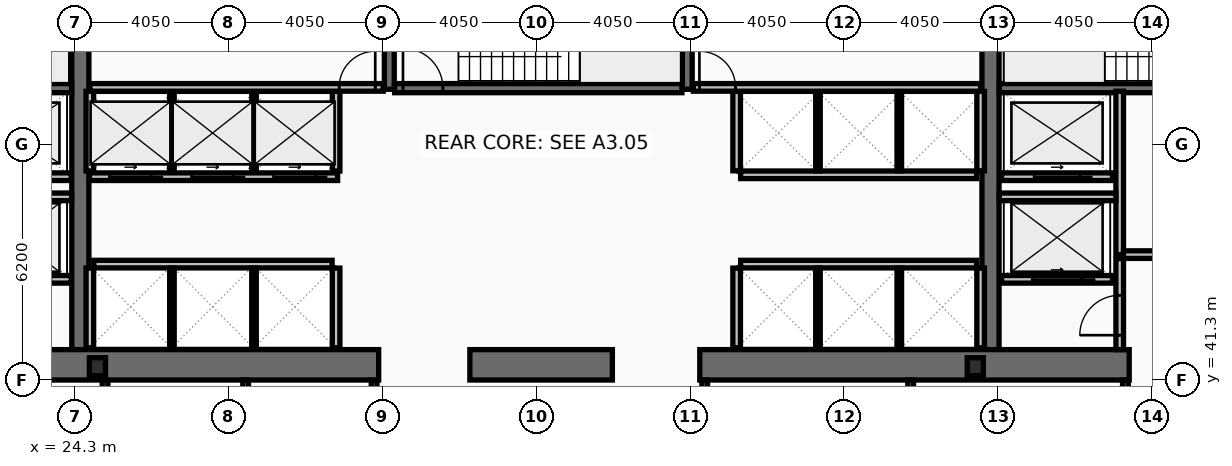
"""IFC4 building model, lengths in metres.
Left out: names, types, materials, properties, quantities, classifications, styles, units other than length and angle.
Written with IfcOpenShell. Run it as: python <this file> out.ifc"""

import sys

from ifc_helpers import new_model, si_unit, direction, frame, frame_2d, origin, origin_2d, place, context, subcontext, project, spatial, rectangle, i_section, extrude, element, fill, save


model = new_model("IFC4")
c1 = context("Model", 3, precision=1e-05, world=origin(), true_north=direction((0.0, 1.0)))
c2 = subcontext(c1, "Body", "Model", "MODEL_VIEW")
j1 = project(units=[si_unit("LENGTHUNIT", "METRE"), si_unit("PLANEANGLEUNIT", "RADIAN")], contexts=[c1])
p1 = place(None, origin())
s1 = spatial("IfcSite", under=j1, at=p1, CompositionType="ELEMENT")
p2 = place(p1, origin())
s2 = spatial("IfcBuilding", under=s1, at=p2, CompositionType="ELEMENT")
p3 = place(p2, frame((0.0, 0.0, 45.8)))
s3 = spatial("IfcBuildingStorey", under=s2, at=p3, CompositionType="ELEMENT", Elevation=45.8)
for number, where, z_axis, x_axis in (
    (1, (24.45, 42.1, 0.0), (0.0, 0.0, 1.0), (0.0, 1.0, 0.0)),
    (2, (48.4, 42.1, 0.0), (0.0, 0.0, 1.0), (0.0, 1.0, 0.0)),
):
    element("IfcWall", number, at=place(p3, frame(where, z_axis=z_axis, x_axis=x_axis)), inside=s3, PredefinedType="SHEAR", context=c2, shape_type="SweptSolid", body=[
        extrude(rectangle(XDim=10.8, YDim=0.45, at=frame_2d((5.4, 0.0))), origin(), (0.0, 0.0, 1.0), 3.82),
    ])
p4 = place(p3, frame((32.3, 41.7, 0.0), z_axis=(0.0, 0.0, 1.0), x_axis=(-1.0, 0.0, 0.0)))
e3 = element("IfcWall", 3, at=p4, inside=s3, PredefinedType="SHEAR", context=c2, shape_type="SweptSolid", body=[
    extrude(rectangle(XDim=11.45, YDim=0.8, at=frame_2d((5.725, 0.0))), origin(), (0.0, 0.0, 1.0), 3.82),
])
p5 = place(p3, frame((38.45, 41.7, 0.0), z_axis=(0.0, 0.0, 1.0), x_axis=(-1.0, 0.0, 0.0)))
e4 = element("IfcWall", 4, at=p5, inside=s3, PredefinedType="SHEAR", context=c2, shape_type="SweptSolid", body=[
    extrude(rectangle(XDim=3.75, YDim=0.8, at=frame_2d((1.875, 0.0))), origin(), (0.0, 0.0, 1.0), 3.82),
])
p6 = place(p3, frame((52.05, 41.7, 0.0), z_axis=(0.0, 0.0, 1.0), x_axis=(-1.0, 0.0, 0.0)))
e5 = element("IfcWall", 5, at=p6, inside=s3, PredefinedType="SHEAR", context=c2, shape_type="SweptSolid", body=[
    extrude(rectangle(XDim=11.3, YDim=0.8, at=frame_2d((5.65, 0.0))), origin(), (0.0, 0.0, 1.0), 3.82),
])
for number, where, z_axis, x_axis in (
    (6, (32.58, 48.95, 0.0), (0.0, 0.0, 1.0), (0.0, 1.0, 0.0)),
    (7, (40.42, 48.95, 0.0), (0.0, 0.0, 1.0), (0.0, 1.0, 0.0)),
):
    element("IfcWall", number, at=place(p3, frame(where, z_axis=z_axis, x_axis=x_axis)), inside=s3, PredefinedType="SHEAR", context=c2, shape_type="SweptSolid", body=[
        extrude(rectangle(XDim=3.95, YDim=0.26, at=frame_2d((1.975, 0.0))), origin(), (0.0, 0.0, 1.0), 3.82),
    ])
p7 = place(p3, frame((17.0, 48.98, 0.0), z_axis=(0.0, 0.0, 1.0), x_axis=(1.0, 0.0, 0.0)))
e8 = element("IfcWall", 8, at=p7, inside=s3, PredefinedType="SHEAR", context=c2, shape_type="SweptSolid", body=[
    extrude(rectangle(XDim=7.22, YDim=0.24, at=frame_2d((3.61, 0.0))), origin(), (0.0, 0.0, 1.0), 3.82),
])
p8 = place(p7, frame((0.22, 0.0, 0.0)))
e9 = element("IfcOpeningElement", 9, at=p8, cuts=e8, PredefinedType="OPENING", context=c2, shape_type="SweptSolid", body=[
    extrude(rectangle(XDim=1.05, YDim=2.15, at=frame_2d((0.525, 1.075))), frame((0.0, 0.13, 0.0), z_axis=(0.0, -1.0, 0.0), x_axis=(1.0, 0.0, 0.0)), (0.0, 0.0, 1.0), 0.26),
])
p9 = place(p3, frame((48.63, 48.98, 0.0), z_axis=(0.0, 0.0, 1.0), x_axis=(1.0, 0.0, 0.0)))
e10 = element("IfcWall", 10, at=p9, inside=s3, PredefinedType="SHEAR", context=c2, shape_type="SweptSolid", body=[
    extrude(rectangle(XDim=7.27, YDim=0.24, at=frame_2d((3.635, 0.0))), origin(), (0.0, 0.0, 1.0), 3.82),
])
p10 = place(p9, frame((6.0, 0.0, 0.0)))
e11 = element("IfcOpeningElement", 11, at=p10, cuts=e10, PredefinedType="OPENING", context=c2, shape_type="SweptSolid", body=[
    extrude(rectangle(XDim=1.05, YDim=2.15, at=frame_2d((0.525, 1.075))), frame((0.0, 0.13, 0.0), z_axis=(0.0, -1.0, 0.0), x_axis=(1.0, 0.0, 0.0)), (0.0, 0.0, 1.0), 0.26),
])
p11 = place(p3, frame((32.72, 48.98, 0.0), z_axis=(0.0, 0.0, 1.0), x_axis=(1.0, 0.0, 0.0)))
e12 = element("IfcWall", 12, at=p11, inside=s3, PredefinedType="SHEAR", context=c2, shape_type="SweptSolid", body=[
    extrude(rectangle(XDim=7.56, YDim=0.24, at=frame_2d((3.78, 0.0))), origin(), (0.0, 0.0, 1.0), 3.82),
])
p12 = place(p11, frame((0.22, 0.0, 0.0)))
e13 = element("IfcOpeningElement", 13, at=p12, cuts=e12, PredefinedType="OPENING", context=c2, shape_type="SweptSolid", body=[
    extrude(rectangle(XDim=1.05, YDim=2.15, at=frame_2d((0.525, 1.075))), frame((0.0, 0.13, 0.0), z_axis=(0.0, -1.0, 0.0), x_axis=(1.0, 0.0, 0.0)), (0.0, 0.0, 1.0), 0.26),
])
for number, where, z_axis, x_axis in (
    (14, (24.9, 41.65, 0.0), (0.0, 0.0, 1.0), (1.0, 0.0, 0.0)),
    (15, (48.0, 41.65, 0.0), (0.0, 0.0, 1.0), (1.0, 0.0, 0.0)),
):
    element("IfcColumn", number, at=place(p3, frame(where, z_axis=z_axis, x_axis=x_axis)), inside=s3, PredefinedType="COLUMN", context=c2, shape_type="SweptSolid", body=[
        extrude(i_section(OverallWidth=0.424, OverallDepth=0.474, WebThickness=0.048, FlangeThickness=0.077, at=origin_2d()), origin(), (0.0, 0.0, 1.0), 4.0),
    ])
p13 = place(p3, frame((51.61, 43.95, 0.0), z_axis=(0.0, 0.0, 1.0), x_axis=(-1.0, 0.0, 0.0)))
e16 = element("IfcWall", 16, at=p13, inside=s3, PredefinedType="PARTITIONING", context=c2, shape_type="SweptSolid", body=[
    extrude(rectangle(XDim=2.92, YDim=0.2, at=frame_2d((1.46, 0.0))), origin(), (0.0, 0.0, 1.0), 3.82),
])
p14 = place(p13, frame((0.81, 0.0, 0.0)))
e17 = element("IfcOpeningElement", 17, at=p14, cuts=e16, PredefinedType="OPENING", context=c2, shape_type="SweptSolid", body=[
    extrude(rectangle(XDim=1.3, YDim=2.18, at=frame_2d((0.65, 1.09))), frame((0.0, 0.11, 0.0), z_axis=(0.0, -1.0, 0.0), x_axis=(1.0, 0.0, 0.0)), (0.0, 0.0, 1.0), 0.22),
])
p15 = place(p3, frame((24.21, 43.95, 0.0), z_axis=(0.0, 0.0, 1.0), x_axis=(-1.0, 0.0, 0.0)))
e18 = element("IfcWall", 18, at=p15, inside=s3, PredefinedType="PARTITIONING", context=c2, shape_type="SweptSolid", body=[
    extrude(rectangle(XDim=2.97, YDim=0.2, at=frame_2d((1.485, 0.0))), origin(), (0.0, 0.0, 1.0), 3.82),
])
p16 = place(p15, frame((0.86, 0.0, 0.0)))
e19 = element("IfcOpeningElement", 19, at=p16, cuts=e18, PredefinedType="OPENING", context=c2, shape_type="SweptSolid", body=[
    extrude(rectangle(XDim=1.3, YDim=2.18, at=frame_2d((0.65, 1.09))), frame((0.0, 0.11, 0.0), z_axis=(0.0, -1.0, 0.0), x_axis=(1.0, 0.0, 0.0)), (0.0, 0.0, 1.0), 0.22),
])
p17 = place(p3, frame((51.61, 46.65, 0.0), z_axis=(0.0, 0.0, 1.0), x_axis=(-1.0, 0.0, 0.0)))
e20 = element("IfcWall", 20, at=p17, inside=s3, PredefinedType="PARTITIONING", context=c2, shape_type="SweptSolid", body=[
    extrude(rectangle(XDim=2.92, YDim=0.2, at=frame_2d((1.46, 0.0))), origin(), (0.0, 0.0, 1.0), 3.82),
])
p18 = place(p17, frame((0.86, 0.0, 0.0)))
e21 = element("IfcOpeningElement", 21, at=p18, cuts=e20, PredefinedType="OPENING", context=c2, shape_type="SweptSolid", body=[
    extrude(rectangle(XDim=1.2, YDim=2.18, at=frame_2d((0.6, 1.09))), frame((0.0, 0.11, 0.0), z_axis=(0.0, -1.0, 0.0), x_axis=(1.0, 0.0, 0.0)), (0.0, 0.0, 1.0), 0.22),
])
p19 = place(p3, frame((24.21, 46.65, 0.0), z_axis=(0.0, 0.0, 1.0), x_axis=(-1.0, 0.0, 0.0)))
e22 = element("IfcWall", 22, at=p19, inside=s3, PredefinedType="PARTITIONING", context=c2, shape_type="SweptSolid", body=[
    extrude(rectangle(XDim=2.97, YDim=0.2, at=frame_2d((1.485, 0.0))), origin(), (0.0, 0.0, 1.0), 3.82),
])
p20 = place(p19, frame((0.91, 0.0, 0.0)))
e23 = element("IfcOpeningElement", 23, at=p20, cuts=e22, PredefinedType="OPENING", context=c2, shape_type="SweptSolid", body=[
    extrude(rectangle(XDim=1.2, YDim=2.18, at=frame_2d((0.6, 1.09))), frame((0.0, 0.11, 0.0), z_axis=(0.0, -1.0, 0.0), x_axis=(1.0, 0.0, 0.0)), (0.0, 0.0, 1.0), 0.22),
])
p21 = place(p3, frame((31.22, 46.65, 0.0), z_axis=(0.0, 0.0, 1.0), x_axis=(-1.0, 0.0, 0.0)))
e24 = element("IfcWall", 24, at=p21, inside=s3, PredefinedType="PARTITIONING", context=c2, shape_type="SweptSolid", body=[
    extrude(rectangle(XDim=6.53, YDim=0.2, at=frame_2d((3.265, 0.0))), origin(), (0.0, 0.0, 1.0), 3.82),
])
p22 = place(p21, frame((4.9, 0.0, 0.0)))
e25 = element("IfcOpeningElement", 25, at=p22, cuts=e24, PredefinedType="OPENING", context=c2, shape_type="SweptSolid", body=[
    extrude(rectangle(XDim=1.1, YDim=2.18, at=frame_2d((0.55, 1.09))), frame((0.0, 0.11, 0.0), z_axis=(0.0, -1.0, 0.0), x_axis=(1.0, 0.0, 0.0)), (0.0, 0.0, 1.0), 0.22),
])
p23 = place(p21, frame((2.74, 0.0, 0.0)))
e26 = element("IfcOpeningElement", 26, at=p23, cuts=e24, PredefinedType="OPENING", context=c2, shape_type="SweptSolid", body=[
    extrude(rectangle(XDim=1.1, YDim=2.18, at=frame_2d((0.55, 1.09))), frame((0.0, 0.11, 0.0), z_axis=(0.0, -1.0, 0.0), x_axis=(1.0, 0.0, 0.0)), (0.0, 0.0, 1.0), 0.22),
])
p24 = place(p21, frame((0.58, 0.0, 0.0)))
e27 = element("IfcOpeningElement", 27, at=p24, cuts=e24, PredefinedType="OPENING", context=c2, shape_type="SweptSolid", body=[
    extrude(rectangle(XDim=1.1, YDim=2.18, at=frame_2d((0.55, 1.09))), frame((0.0, 0.11, 0.0), z_axis=(0.0, -1.0, 0.0), x_axis=(1.0, 0.0, 0.0)), (0.0, 0.0, 1.0), 0.22),
])
p25 = place(p3, frame((21.2, 46.12, 0.0), z_axis=(0.0, 0.0, 1.0), x_axis=(1.0, 0.0, 0.0)))
e28 = element("IfcWall", 28, at=p25, inside=s3, PredefinedType="PARTITIONING", context=c2, shape_type="SweptSolid", body=[
    extrude(rectangle(XDim=3.02, YDim=0.2, at=frame_2d((1.51, 0.0))), origin(), (0.0, 0.0, 1.0), 3.82),
])
p26 = place(p3, frame((51.8, 44.6, 0.0), z_axis=(0.0, 0.0, 1.0), x_axis=(0.0, 1.0, 0.0)))
e29 = element("IfcWall", 29, at=p26, inside=s3, PredefinedType="PARTITIONING", context=c2, shape_type="SweptSolid", body=[
    extrude(rectangle(XDim=4.3, YDim=0.2, at=frame_2d((2.15, 0.0))), origin(), (0.0, 0.0, 1.0), 3.82),
])
p27 = place(p3, frame((51.9, 44.6, 0.0), z_axis=(0.0, 0.0, 1.0), x_axis=(1.0, 0.0, 0.0)))
e30 = element("IfcWall", 30, at=p27, inside=s3, PredefinedType="PARTITIONING", context=c2, shape_type="SweptSolid", body=[
    extrude(rectangle(XDim=4.0, YDim=0.2, at=frame_2d((2.0, 0.0))), origin(), (0.0, 0.0, 1.0), 3.82),
])
p28 = place(p27, frame((1.15, 0.0, 0.0)))
e31 = element("IfcOpeningElement", 31, at=p28, cuts=e30, PredefinedType="OPENING", context=c2, shape_type="SweptSolid", body=[
    extrude(rectangle(XDim=1.05, YDim=2.15, at=frame_2d((0.525, 1.075))), frame((0.0, 0.11, 0.0), z_axis=(0.0, -1.0, 0.0), x_axis=(1.0, 0.0, 0.0)), (0.0, 0.0, 1.0), 0.22),
])
p29 = place(p3, frame((48.63, 46.12, 0.0), z_axis=(0.0, 0.0, 1.0), x_axis=(1.0, 0.0, 0.0)))
e32 = element("IfcWall", 32, at=p29, inside=s3, PredefinedType="PARTITIONING", context=c2, shape_type="SweptSolid", body=[
    extrude(rectangle(XDim=3.07, YDim=0.2, at=frame_2d((1.535, 0.0))), origin(), (0.0, 0.0, 1.0), 3.82),
])
p30 = place(p3, frame((51.8, 42.1, 0.0), z_axis=(0.0, 0.0, 1.0), x_axis=(0.0, 1.0, 0.0)))
e33 = element("IfcWall", 33, at=p30, inside=s3, PredefinedType="PARTITIONING", context=c2, shape_type="SweptSolid", body=[
    extrude(rectangle(XDim=2.395, YDim=0.2, at=frame_2d((1.198, 0.0))), origin(), (0.0, 0.0, 1.0), 3.82),
])
p31 = place(p30, frame((0.38, 0.0, 0.0)))
e34 = element("IfcOpeningElement", 34, at=p31, cuts=e33, PredefinedType="OPENING", context=c2, shape_type="SweptSolid", body=[
    extrude(rectangle(XDim=1.05, YDim=2.15, at=frame_2d((0.525, 1.075))), frame((0.0, 0.11, 0.0), z_axis=(0.0, -1.0, 0.0), x_axis=(1.0, 0.0, 0.0)), (0.0, 0.0, 1.0), 0.22),
])
for number, where, z_axis, x_axis in (
    (35, (24.7, 46.8, 0.0), (0.0, 0.0, 1.0), (0.0, 1.0, 0.0)),
    (36, (31.18, 46.8, 0.0), (0.0, 0.0, 1.0), (0.0, 1.0, 0.0)),
):
    element("IfcWall", number, at=place(p3, frame(where, z_axis=z_axis, x_axis=x_axis)), inside=s3, PredefinedType="PARTITIONING", context=c2, shape_type="SweptSolid", body=[
        extrude(rectangle(XDim=2.095, YDim=0.2, at=frame_2d((1.047, 0.0))), origin(), (0.0, 0.0, 1.0), 3.82),
    ])
for number, where, z_axis, x_axis in (
    (37, (26.86, 46.8, 0.0), (0.0, 0.0, 1.0), (0.0, 1.0, 0.0)),
    (38, (29.02, 46.8, 0.0), (0.0, 0.0, 1.0), (0.0, 1.0, 0.0)),
):
    element("IfcWall", number, at=place(p3, frame(where, z_axis=z_axis, x_axis=x_axis)), inside=s3, PredefinedType="PARTITIONING", context=c2, shape_type="SweptSolid", body=[
        extrude(rectangle(XDim=2.095, YDim=0.12, at=frame_2d((1.047, 0.0))), origin(), (0.0, 0.0, 1.0), 3.82),
    ])
p32 = place(p3, frame((24.805, 44.35, 0.0), z_axis=(0.0, 0.0, 1.0), x_axis=(1.0, 0.0, 0.0)))
e39 = element("IfcWall", 39, at=p32, inside=s3, PredefinedType="PARTITIONING", context=c2, shape_type="SweptSolid", body=[
    extrude(rectangle(XDim=6.27, YDim=0.2, at=frame_2d((3.135, 0.0))), origin(), (0.0, 0.0, 1.0), 3.82),
])
for number, where, z_axis, x_axis in (
    (40, (24.7, 42.15, 0.0), (0.0, 0.0, 1.0), (0.0, 1.0, 0.0)),
    (41, (31.18, 42.15, 0.0), (0.0, 0.0, 1.0), (0.0, 1.0, 0.0)),
):
    element("IfcWall", number, at=place(p3, frame(where, z_axis=z_axis, x_axis=x_axis)), inside=s3, PredefinedType="PARTITIONING", context=c2, shape_type="SweptSolid", body=[
        extrude(rectangle(XDim=2.095, YDim=0.2, at=frame_2d((1.048, 0.0))), origin(), (0.0, 0.0, 1.0), 3.82),
    ])
for number, where, z_axis, x_axis in (
    (42, (26.86, 42.15, 0.0), (0.0, 0.0, 1.0), (0.0, 1.0, 0.0)),
    (43, (29.02, 42.15, 0.0), (0.0, 0.0, 1.0), (0.0, 1.0, 0.0)),
):
    element("IfcWall", number, at=place(p3, frame(where, z_axis=z_axis, x_axis=x_axis)), inside=s3, PredefinedType="PARTITIONING", context=c2, shape_type="SweptSolid", body=[
        extrude(rectangle(XDim=2.095, YDim=0.12, at=frame_2d((1.048, 0.0))), origin(), (0.0, 0.0, 1.0), 3.82),
    ])
p33 = place(p3, frame((41.825, 46.7, 0.0), z_axis=(0.0, 0.0, 1.0), x_axis=(1.0, 0.0, 0.0)))
e44 = element("IfcWall", 44, at=p33, inside=s3, PredefinedType="PARTITIONING", context=c2, shape_type="SweptSolid", body=[
    extrude(rectangle(XDim=6.21, YDim=0.2, at=frame_2d((3.105, 0.0))), origin(), (0.0, 0.0, 1.0), 3.82),
])
for number, where, z_axis, x_axis in (
    (45, (41.72, 46.805, 0.0), (0.0, 0.0, 1.0), (0.0, 1.0, 0.0)),
    (46, (48.14, 46.805, 0.0), (0.0, 0.0, 1.0), (0.0, 1.0, 0.0)),
):
    element("IfcWall", number, at=place(p3, frame(where, z_axis=z_axis, x_axis=x_axis)), inside=s3, PredefinedType="PARTITIONING", context=c2, shape_type="SweptSolid", body=[
        extrude(rectangle(XDim=2.09, YDim=0.2, at=frame_2d((1.045, 0.0))), origin(), (0.0, 0.0, 1.0), 3.82),
    ])
for number, where, z_axis, x_axis in (
    (47, (43.86, 46.805, 0.0), (0.0, 0.0, 1.0), (0.0, 1.0, 0.0)),
    (48, (46.0, 46.805, 0.0), (0.0, 0.0, 1.0), (0.0, 1.0, 0.0)),
):
    element("IfcWall", number, at=place(p3, frame(where, z_axis=z_axis, x_axis=x_axis)), inside=s3, PredefinedType="PARTITIONING", context=c2, shape_type="SweptSolid", body=[
        extrude(rectangle(XDim=2.09, YDim=0.12, at=frame_2d((1.045, 0.0))), origin(), (0.0, 0.0, 1.0), 3.82),
    ])
p34 = place(p3, frame((41.825, 44.35, 0.0), z_axis=(0.0, 0.0, 1.0), x_axis=(1.0, 0.0, 0.0)))
e49 = element("IfcWall", 49, at=p34, inside=s3, PredefinedType="PARTITIONING", context=c2, shape_type="SweptSolid", body=[
    extrude(rectangle(XDim=6.21, YDim=0.2, at=frame_2d((3.105, 0.0))), origin(), (0.0, 0.0, 1.0), 3.82),
])
for number, where, z_axis, x_axis in (
    (50, (41.72, 42.15, 0.0), (0.0, 0.0, 1.0), (0.0, 1.0, 0.0)),
    (51, (48.14, 42.15, 0.0), (0.0, 0.0, 1.0), (0.0, 1.0, 0.0)),
):
    element("IfcWall", number, at=place(p3, frame(where, z_axis=z_axis, x_axis=x_axis)), inside=s3, PredefinedType="PARTITIONING", context=c2, shape_type="SweptSolid", body=[
        extrude(rectangle(XDim=2.095, YDim=0.2, at=frame_2d((1.048, 0.0))), origin(), (0.0, 0.0, 1.0), 3.82),
    ])
for number, where, z_axis, x_axis in (
    (52, (43.86, 42.15, 0.0), (0.0, 0.0, 1.0), (0.0, 1.0, 0.0)),
    (53, (46.0, 42.15, 0.0), (0.0, 0.0, 1.0), (0.0, 1.0, 0.0)),
):
    element("IfcWall", number, at=place(p3, frame(where, z_axis=z_axis, x_axis=x_axis)), inside=s3, PredefinedType="PARTITIONING", context=c2, shape_type="SweptSolid", body=[
        extrude(rectangle(XDim=2.095, YDim=0.12, at=frame_2d((1.048, 0.0))), origin(), (0.0, 0.0, 1.0), 3.82),
    ])
p35 = place(p3, frame((24.7, 49.0, 0.0), z_axis=(0.0, 0.0, 1.0), x_axis=(1.0, 0.0, 0.0)))
e54 = element("IfcWall", 54, at=p35, inside=s3, PredefinedType="PARTITIONING", context=c2, shape_type="SweptSolid", body=[
    extrude(rectangle(XDim=7.72, YDim=0.2, at=frame_2d((3.86, 0.0))), origin(), (0.0, 0.0, 1.0), 3.82),
])
p36 = place(p35, frame((6.56, 0.0, 0.0)))
e55 = element("IfcOpeningElement", 55, at=p36, cuts=e54, PredefinedType="OPENING", context=c2, shape_type="SweptSolid", body=[
    extrude(rectangle(XDim=0.95, YDim=2.1, at=frame_2d((0.475, 1.05))), frame((0.0, 0.11, 0.0), z_axis=(0.0, -1.0, 0.0), x_axis=(1.0, 0.0, 0.0)), (0.0, 0.0, 1.0), 0.22),
])
p37 = place(p3, frame((40.58, 49.0, 0.0), z_axis=(0.0, 0.0, 1.0), x_axis=(1.0, 0.0, 0.0)))
e56 = element("IfcWall", 56, at=p37, inside=s3, PredefinedType="PARTITIONING", context=c2, shape_type="SweptSolid", body=[
    extrude(rectangle(XDim=7.56, YDim=0.2, at=frame_2d((3.78, 0.0))), origin(), (0.0, 0.0, 1.0), 3.82),
])
p38 = place(p37, frame((0.16, 0.0, 0.0)))
e57 = element("IfcOpeningElement", 57, at=p38, cuts=e56, PredefinedType="OPENING", context=c2, shape_type="SweptSolid", body=[
    extrude(rectangle(XDim=0.95, YDim=2.1, at=frame_2d((0.475, 1.05))), frame((0.0, 0.11, 0.0), z_axis=(0.0, -1.0, 0.0), x_axis=(1.0, 0.0, 0.0)), (0.0, 0.0, 1.0), 0.22),
])
p39 = place(p3, frame((25.1, 38.28, 0.0), z_axis=(0.0, 0.0, 1.0), x_axis=(0.0, 1.0, 0.0)))
e58 = element("IfcWall", 58, at=p39, inside=s3, PredefinedType="PARTITIONING", context=c2, shape_type="SweptSolid", body=[
    extrude(rectangle(XDim=3.02, YDim=0.15, at=frame_2d((1.51, 0.0))), origin(), (0.0, 0.0, 1.0), 3.01),
])
for number, where, z_axis, x_axis in (
    (59, (28.8, 38.28, 0.0), (0.0, 0.0, 1.0), (0.0, 1.0, 0.0)),
    (60, (32.18, 38.28, 0.0), (0.0, 0.0, 1.0), (0.0, 1.0, 0.0)),
    (61, (40.88, 38.28, 0.0), (0.0, 0.0, 1.0), (0.0, 1.0, 0.0)),
    (62, (46.3, 38.28, 0.0), (0.0, 0.0, 1.0), (0.0, 1.0, 0.0)),
    (63, (51.95, 38.28, 0.0), (0.0, 0.0, 1.0), (0.0, 1.0, 0.0)),
):
    element("IfcWall", number, at=place(p3, frame(where, z_axis=z_axis, x_axis=x_axis)), inside=s3, PredefinedType="PARTITIONING", context=c2, shape_type="SweptSolid", body=[
        extrude(rectangle(XDim=3.02, YDim=0.15, at=frame_2d((1.51, 0.0))), origin(), (0.0, 0.0, 1.0), 3.82),
    ])
p40 = place(p12, origin())
e64 = element("IfcDoor", 64, at=p40, inside=s3, OperationType="SINGLE_SWING_LEFT", PredefinedType="DOOR", context=c2, shape_type="SweptSolid", body=[
    extrude(rectangle(XDim=1.05, YDim=2.15, at=frame_2d((0.525, 1.075))), frame((0.0, 0.025, 0.0), z_axis=(0.0, -1.0, 0.0), x_axis=(1.0, 0.0, 0.0)), (0.0, 0.0, 1.0), 0.05),
])
fill(e13, e64)
p41 = place(p14, origin())
e65 = element("IfcDoor", 65, at=p41, inside=s3, OperationType="SLIDING_TO_LEFT", PredefinedType="DOOR", context=c2, shape_type="SweptSolid", body=[
    extrude(rectangle(XDim=1.3, YDim=2.18, at=frame_2d((0.65, 1.09))), frame((0.0, 0.025, 0.0), z_axis=(0.0, -1.0, 0.0), x_axis=(1.0, 0.0, 0.0)), (0.0, 0.0, 1.0), 0.05),
])
fill(e17, e65)
p42 = place(p18, origin())
e66 = element("IfcDoor", 66, at=p42, inside=s3, OperationType="SLIDING_TO_LEFT", PredefinedType="DOOR", context=c2, shape_type="SweptSolid", body=[
    extrude(rectangle(XDim=1.2, YDim=2.18, at=frame_2d((0.6, 1.09))), frame((0.0, 0.025, 0.0), z_axis=(0.0, -1.0, 0.0), x_axis=(1.0, 0.0, 0.0)), (0.0, 0.0, 1.0), 0.05),
])
fill(e21, e66)
p43 = place(p22, origin())
e67 = element("IfcDoor", 67, at=p43, inside=s3, OperationType="SLIDING_TO_LEFT", PredefinedType="DOOR", context=c2, shape_type="SweptSolid", body=[
    extrude(rectangle(XDim=1.1, YDim=2.18, at=frame_2d((0.55, 1.09))), frame((0.0, 0.025, 0.0), z_axis=(0.0, -1.0, 0.0), x_axis=(1.0, 0.0, 0.0)), (0.0, 0.0, 1.0), 0.05),
])
fill(e25, e67)
p44 = place(p23, origin())
e68 = element("IfcDoor", 68, at=p44, inside=s3, OperationType="SLIDING_TO_LEFT", PredefinedType="DOOR", context=c2, shape_type="SweptSolid", body=[
    extrude(rectangle(XDim=1.1, YDim=2.18, at=frame_2d((0.55, 1.09))), frame((0.0, 0.025, 0.0), z_axis=(0.0, -1.0, 0.0), x_axis=(1.0, 0.0, 0.0)), (0.0, 0.0, 1.0), 0.05),
])
fill(e26, e68)
p45 = place(p24, origin())
e69 = element("IfcDoor", 69, at=p45, inside=s3, OperationType="SLIDING_TO_LEFT", PredefinedType="DOOR", context=c2, shape_type="SweptSolid", body=[
    extrude(rectangle(XDim=1.1, YDim=2.18, at=frame_2d((0.55, 1.09))), frame((0.0, 0.025, 0.0), z_axis=(0.0, -1.0, 0.0), x_axis=(1.0, 0.0, 0.0)), (0.0, 0.0, 1.0), 0.05),
])
fill(e27, e69)
p46 = place(p31, origin())
e70 = element("IfcDoor", 70, at=p46, inside=s3, OperationType="SINGLE_SWING_LEFT", PredefinedType="DOOR", context=c2, shape_type="SweptSolid", body=[
    extrude(rectangle(XDim=1.05, YDim=2.15, at=frame_2d((0.525, 1.075))), frame((0.0, 0.025, 0.0), z_axis=(0.0, -1.0, 0.0), x_axis=(1.0, 0.0, 0.0)), (0.0, 0.0, 1.0), 0.05),
])
fill(e34, e70)
p47 = place(p36, origin())
e71 = element("IfcDoor", 71, at=p47, inside=s3, OperationType="SINGLE_SWING_RIGHT", PredefinedType="DOOR", context=c2, shape_type="SweptSolid", body=[
    extrude(rectangle(XDim=0.95, YDim=2.1, at=frame_2d((0.475, 1.05))), frame((0.0, 0.025, 0.0), z_axis=(0.0, -1.0, 0.0), x_axis=(1.0, 0.0, 0.0)), (0.0, 0.0, 1.0), 0.05),
])
fill(e55, e71)
p48 = place(p38, origin())
e72 = element("IfcDoor", 72, at=p48, inside=s3, OperationType="SINGLE_SWING_LEFT", PredefinedType="DOOR", context=c2, shape_type="SweptSolid", body=[
    extrude(rectangle(XDim=0.95, YDim=2.1, at=frame_2d((0.475, 1.05))), frame((0.0, 0.025, 0.0), z_axis=(0.0, -1.0, 0.0), x_axis=(1.0, 0.0, 0.0)), (0.0, 0.0, 1.0), 0.05),
])
fill(e57, e72)
save(model, sys.argv[1])
